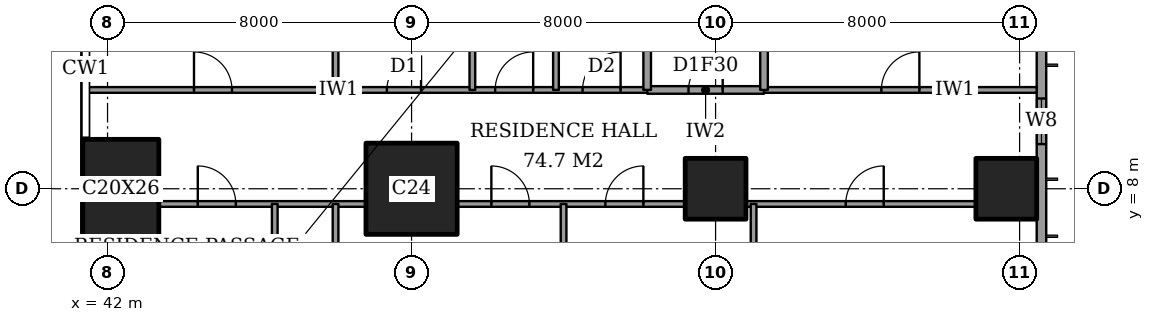
"""IFC4 building model, lengths in metres.
Left out: names, types, materials, properties, quantities, classifications, styles, units other than length and angle.
Written with IfcOpenShell. Run it as: python <this file> out.ifc"""

import sys

from ifc_helpers import new_model, si_unit, direction, frame, frame_2d, origin, origin_2d, place, context, subcontext, project, spatial, rectangle, extrude, element, fill, save


model = new_model("IFC4")
c1 = context("Model", 3, precision=1e-05, world=origin(), true_north=direction((0.0, 1.0)))
c2 = subcontext(c1, "Body", "Model", "MODEL_VIEW")
j1 = project(units=[si_unit("LENGTHUNIT", "METRE"), si_unit("PLANEANGLEUNIT", "RADIAN")], contexts=[c1])
p1 = place(None, origin())
s1 = spatial("IfcSite", under=j1, at=p1, CompositionType="ELEMENT")
p2 = place(p1, origin())
s2 = spatial("IfcBuilding", under=s1, at=p2, CompositionType="ELEMENT")
p3 = place(p2, frame((0.0, 0.0, 266.4)))
s3 = spatial("IfcBuildingStorey", under=s2, at=p3, CompositionType="ELEMENT", Elevation=266.4)
p4 = place(p3, frame((42.35, 8.0, 0.0), z_axis=(0.0, 0.0, 1.0), x_axis=(1.0, 0.0, 0.0)))
e1 = element("IfcColumn", 1, at=p4, inside=s3, PredefinedType="COLUMN", context=c2, shape_type="SweptSolid", body=[
    extrude(rectangle(XDim=2.0, YDim=2.6, at=origin_2d()), origin(), (0.0, 0.0, 1.0), 3.6),
])
p5 = place(p3, frame((50.0, 8.0, 0.0), z_axis=(0.0, 0.0, 1.0), x_axis=(1.0, 0.0, 0.0)))
e2 = element("IfcColumn", 2, at=p5, inside=s3, PredefinedType="COLUMN", context=c2, shape_type="SweptSolid", body=[
    extrude(rectangle(XDim=2.4, YDim=2.4, at=origin_2d()), origin(), (0.0, 0.0, 1.0), 3.6),
])
for number, where, z_axis, x_axis in (
    (3, (58.0, 8.0, 0.0), (0.0, 0.0, 1.0), (1.0, 0.0, 0.0)),
    (4, (65.65, 8.0, 0.0), (0.0, 0.0, 1.0), (1.0, 0.0, 0.0)),
):
    element("IfcColumn", number, at=place(p3, frame(where, z_axis=z_axis, x_axis=x_axis)), inside=s3, PredefinedType="COLUMN", context=c2, shape_type="SweptSolid", body=[
        extrude(rectangle(XDim=1.6, YDim=1.6, at=origin_2d()), origin(), (0.0, 0.0, 1.0), 3.6),
    ])
p6 = place(p3, frame((66.575, 3.175, 0.0), z_axis=(0.0, 0.0, 1.0), x_axis=(0.0, 1.0, 0.0)))
e5 = element("IfcWall", 5, at=p6, inside=s3, PredefinedType="SOLIDWALL", context=c2, shape_type="SweptSolid", body=[
    extrude(rectangle(XDim=41.65, YDim=0.25, at=frame_2d((20.825, 0.0))), origin(), (0.0, 0.0, 1.0), 3.6),
])
p7 = place(p6, frame((0.875, 0.0, 0.6)))
e6 = element("IfcOpeningElement", 6, at=p7, cuts=e5, PredefinedType="OPENING", context=c2, shape_type="SweptSolid", body=[
    extrude(rectangle(XDim=2.4, YDim=2.0, at=frame_2d((1.2, 1.0))), frame((0.0, 0.135, 0.0), z_axis=(0.0, -1.0, 0.0), x_axis=(1.0, 0.0, 0.0)), (0.0, 0.0, 1.0), 0.27),
])
p8 = place(p6, frame((6.0, 0.0, 0.6)))
e7 = element("IfcOpeningElement", 7, at=p8, cuts=e5, PredefinedType="OPENING", context=c2, shape_type="SweptSolid", body=[
    extrude(rectangle(XDim=1.2, YDim=2.0, at=frame_2d((0.6, 1.0))), frame((0.0, 0.135, 0.0), z_axis=(0.0, -1.0, 0.0), x_axis=(1.0, 0.0, 0.0)), (0.0, 0.0, 1.0), 0.27),
])
p9 = place(p6, frame((8.525, 0.0, 0.6)))
e8 = element("IfcOpeningElement", 8, at=p9, cuts=e5, PredefinedType="OPENING", context=c2, shape_type="SweptSolid", body=[
    extrude(rectangle(XDim=2.4, YDim=2.0, at=frame_2d((1.2, 1.0))), frame((0.0, 0.135, 0.0), z_axis=(0.0, -1.0, 0.0), x_axis=(1.0, 0.0, 0.0)), (0.0, 0.0, 1.0), 0.27),
])
p10 = place(p6, frame((15.625, 0.0, 0.6)))
e9 = element("IfcOpeningElement", 9, at=p10, cuts=e5, PredefinedType="OPENING", context=c2, shape_type="SweptSolid", body=[
    extrude(rectangle(XDim=2.4, YDim=2.0, at=frame_2d((1.2, 1.0))), frame((0.0, 0.135, 0.0), z_axis=(0.0, -1.0, 0.0), x_axis=(1.0, 0.0, 0.0)), (0.0, 0.0, 1.0), 0.27),
])
p11 = place(p6, frame((23.525, 0.0, 0.6)))
e10 = element("IfcOpeningElement", 10, at=p11, cuts=e5, PredefinedType="OPENING", context=c2, shape_type="SweptSolid", body=[
    extrude(rectangle(XDim=2.4, YDim=2.0, at=frame_2d((1.2, 1.0))), frame((0.0, 0.135, 0.0), z_axis=(0.0, -1.0, 0.0), x_axis=(1.0, 0.0, 0.0)), (0.0, 0.0, 1.0), 0.27),
])
p12 = place(p6, frame((30.625, 0.0, 0.6)))
e11 = element("IfcOpeningElement", 11, at=p12, cuts=e5, PredefinedType="OPENING", context=c2, shape_type="SweptSolid", body=[
    extrude(rectangle(XDim=2.4, YDim=2.0, at=frame_2d((1.2, 1.0))), frame((0.0, 0.135, 0.0), z_axis=(0.0, -1.0, 0.0), x_axis=(1.0, 0.0, 0.0)), (0.0, 0.0, 1.0), 0.27),
])
p13 = place(p6, frame((34.325, 0.0, 0.6)))
e12 = element("IfcOpeningElement", 12, at=p13, cuts=e5, PredefinedType="OPENING", context=c2, shape_type="SweptSolid", body=[
    extrude(rectangle(XDim=1.2, YDim=2.0, at=frame_2d((0.6, 1.0))), frame((0.0, 0.135, 0.0), z_axis=(0.0, -1.0, 0.0), x_axis=(1.0, 0.0, 0.0)), (0.0, 0.0, 1.0), 0.27),
])
p14 = place(p6, frame((38.375, 0.0, 0.6)))
e13 = element("IfcOpeningElement", 13, at=p14, cuts=e5, PredefinedType="OPENING", context=c2, shape_type="SweptSolid", body=[
    extrude(rectangle(XDim=2.4, YDim=2.0, at=frame_2d((1.2, 1.0))), frame((0.0, 0.135, 0.0), z_axis=(0.0, -1.0, 0.0), x_axis=(1.0, 0.0, 0.0)), (0.0, 0.0, 1.0), 0.27),
])
p15 = place(p3, frame((43.35, 7.6, 0.0), z_axis=(0.0, 0.0, 1.0), x_axis=(1.0, 0.0, 0.0)))
e14 = element("IfcWall", 14, at=p15, inside=s3, PredefinedType="PARTITIONING", context=c2, shape_type="SweptSolid", body=[
    extrude(rectangle(XDim=5.45, YDim=0.15, at=frame_2d((2.725, 0.0))), origin(), (0.0, 0.0, 1.0), 3.35),
])
p16 = place(p15, frame((1.025, 0.0, 0.0)))
e15 = element("IfcOpeningElement", 15, at=p16, cuts=e14, PredefinedType="OPENING", context=c2, shape_type="SweptSolid", body=[
    extrude(rectangle(XDim=1.0, YDim=2.1, at=frame_2d((0.5, 1.05))), frame((0.0, 0.085, 0.0), z_axis=(0.0, -1.0, 0.0), x_axis=(1.0, 0.0, 0.0)), (0.0, 0.0, 1.0), 0.17),
])
p17 = place(p3, frame((51.2, 7.6, 0.0), z_axis=(0.0, 0.0, 1.0), x_axis=(1.0, 0.0, 0.0)))
e16 = element("IfcWall", 16, at=p17, inside=s3, PredefinedType="PARTITIONING", context=c2, shape_type="SweptSolid", body=[
    extrude(rectangle(XDim=6.0, YDim=0.15, at=frame_2d((3.0, 0.0))), origin(), (0.0, 0.0, 1.0), 3.35),
])
p18 = place(p17, frame((3.9, 0.0, 0.0)))
e17 = element("IfcOpeningElement", 17, at=p18, cuts=e16, PredefinedType="OPENING", context=c2, shape_type="SweptSolid", body=[
    extrude(rectangle(XDim=1.0, YDim=2.1, at=frame_2d((0.5, 1.05))), frame((0.0, 0.085, 0.0), z_axis=(0.0, -1.0, 0.0), x_axis=(1.0, 0.0, 0.0)), (0.0, 0.0, 1.0), 0.17),
])
p19 = place(p17, frame((0.9, 0.0, 0.0)))
e18 = element("IfcOpeningElement", 18, at=p19, cuts=e16, PredefinedType="OPENING", context=c2, shape_type="SweptSolid", body=[
    extrude(rectangle(XDim=1.0, YDim=2.1, at=frame_2d((0.5, 1.05))), frame((0.0, 0.085, 0.0), z_axis=(0.0, -1.0, 0.0), x_axis=(1.0, 0.0, 0.0)), (0.0, 0.0, 1.0), 0.17),
])
p20 = place(p3, frame((58.8, 7.6, 0.0), z_axis=(0.0, 0.0, 1.0), x_axis=(1.0, 0.0, 0.0)))
e19 = element("IfcWall", 19, at=p20, inside=s3, PredefinedType="PARTITIONING", context=c2, shape_type="SweptSolid", body=[
    extrude(rectangle(XDim=6.05, YDim=0.15, at=frame_2d((3.025, 0.0))), origin(), (0.0, 0.0, 1.0), 3.35),
])
p21 = place(p20, frame((2.625, 0.0, 0.0)))
e20 = element("IfcOpeningElement", 20, at=p21, cuts=e19, PredefinedType="OPENING", context=c2, shape_type="SweptSolid", body=[
    extrude(rectangle(XDim=1.0, YDim=2.1, at=frame_2d((0.5, 1.05))), frame((0.0, 0.085, 0.0), z_axis=(0.0, -1.0, 0.0), x_axis=(1.0, 0.0, 0.0)), (0.0, 0.0, 1.0), 0.17),
])
p22 = place(p3, frame((56.2, 10.6, 0.0), z_axis=(0.0, 0.0, 1.0), x_axis=(1.0, 0.0, 0.0)))
e21 = element("IfcWall", 21, at=p22, inside=s3, PredefinedType="PARTITIONING", context=c2, shape_type="SweptSolid", body=[
    extrude(rectangle(XDim=3.075, YDim=0.2, at=frame_2d((1.538, 0.0))), origin(), (0.0, 0.0, 1.0), 3.35),
])
p23 = place(p22, frame((1.087, 0.0, 0.0)))
e22 = element("IfcOpeningElement", 22, at=p23, cuts=e21, PredefinedType="OPENING", context=c2, shape_type="SweptSolid", body=[
    extrude(rectangle(XDim=0.9, YDim=2.1, at=frame_2d((0.45, 1.05))), frame((0.0, 0.11, 0.0), z_axis=(0.0, -1.0, 0.0), x_axis=(1.0, 0.0, 0.0)), (0.0, 0.0, 1.0), 0.22),
])
p24 = place(p3, frame((41.439, 10.6, 0.0), z_axis=(0.0, 0.0, 1.0), x_axis=(1.0, 0.0, 0.0)))
e23 = element("IfcWall", 23, at=p24, inside=s3, PredefinedType="PARTITIONING", context=c2, shape_type="SweptSolid", body=[
    extrude(rectangle(XDim=14.761, YDim=0.15, at=frame_2d((7.38, 0.0))), origin(), (0.0, 0.0, 1.0), 3.35),
])
p25 = place(p24, frame((10.761, 0.0, 0.0)))
e24 = element("IfcOpeningElement", 24, at=p25, cuts=e23, PredefinedType="OPENING", context=c2, shape_type="SweptSolid", body=[
    extrude(rectangle(XDim=1.0, YDim=2.1, at=frame_2d((0.5, 1.05))), frame((0.0, 0.085, 0.0), z_axis=(0.0, -1.0, 0.0), x_axis=(1.0, 0.0, 0.0)), (0.0, 0.0, 1.0), 0.17),
])
p26 = place(p24, frame((13.061, 0.0, 0.0)))
e25 = element("IfcOpeningElement", 25, at=p26, cuts=e23, PredefinedType="OPENING", context=c2, shape_type="SweptSolid", body=[
    extrude(rectangle(XDim=1.0, YDim=2.1, at=frame_2d((0.5, 1.05))), frame((0.0, 0.085, 0.0), z_axis=(0.0, -1.0, 0.0), x_axis=(1.0, 0.0, 0.0)), (0.0, 0.0, 1.0), 0.17),
])
p27 = place(p24, frame((7.911, 0.0, 0.0)))
e26 = element("IfcOpeningElement", 26, at=p27, cuts=e23, PredefinedType="OPENING", context=c2, shape_type="SweptSolid", body=[
    extrude(rectangle(XDim=0.9, YDim=2.1, at=frame_2d((0.45, 1.05))), frame((0.0, 0.085, 0.0), z_axis=(0.0, -1.0, 0.0), x_axis=(1.0, 0.0, 0.0)), (0.0, 0.0, 1.0), 0.17),
])
p28 = place(p24, frame((2.836, 0.0, 0.0)))
e27 = element("IfcOpeningElement", 27, at=p28, cuts=e23, PredefinedType="OPENING", context=c2, shape_type="SweptSolid", body=[
    extrude(rectangle(XDim=1.0, YDim=2.1, at=frame_2d((0.5, 1.05))), frame((0.0, 0.085, 0.0), z_axis=(0.0, -1.0, 0.0), x_axis=(1.0, 0.0, 0.0)), (0.0, 0.0, 1.0), 0.17),
])
p29 = place(p3, frame((59.275, 10.6, 0.0), z_axis=(0.0, 0.0, 1.0), x_axis=(1.0, 0.0, 0.0)))
e28 = element("IfcWall", 28, at=p29, inside=s3, PredefinedType="PARTITIONING", context=c2, shape_type="SweptSolid", body=[
    extrude(rectangle(XDim=7.175, YDim=0.15, at=frame_2d((3.587, 0.0))), origin(), (0.0, 0.0, 1.0), 3.35),
])
p30 = place(p29, frame((3.087, 0.0, 0.0)))
e29 = element("IfcOpeningElement", 29, at=p30, cuts=e28, PredefinedType="OPENING", context=c2, shape_type="SweptSolid", body=[
    extrude(rectangle(XDim=1.0, YDim=2.1, at=frame_2d((0.5, 1.05))), frame((0.0, 0.085, 0.0), z_axis=(0.0, -1.0, 0.0), x_axis=(1.0, 0.0, 0.0)), (0.0, 0.0, 1.0), 0.17),
])
p31 = place(p3, frame((46.4, -0.45, 0.0), z_axis=(0.0, 0.0, 1.0), x_axis=(0.0, 1.0, 0.0)))
e30 = element("IfcWall", 30, at=p31, inside=s3, PredefinedType="PARTITIONING", context=c2, shape_type="SweptSolid", body=[
    extrude(rectangle(XDim=8.05, YDim=0.15, at=frame_2d((4.025, 0.0))), origin(), (0.0, 0.0, 1.0), 3.35),
])
p32 = place(p31, frame((3.575, 0.0, 0.0)))
e31 = element("IfcOpeningElement", 31, at=p32, cuts=e30, PredefinedType="OPENING", context=c2, shape_type="SweptSolid", body=[
    extrude(rectangle(XDim=0.9, YDim=2.1, at=frame_2d((0.45, 1.05))), frame((0.0, 0.085, 0.0), z_axis=(0.0, -1.0, 0.0), x_axis=(1.0, 0.0, 0.0)), (0.0, 0.0, 1.0), 0.17),
])
p33 = place(p3, frame((48.0, -0.45, 0.0), z_axis=(0.0, 0.0, 1.0), x_axis=(0.0, 1.0, 0.0)))
e32 = element("IfcWall", 32, at=p33, inside=s3, PredefinedType="PARTITIONING", context=c2, shape_type="SweptSolid", body=[
    extrude(rectangle(XDim=8.05, YDim=0.15, at=frame_2d((4.025, 0.0))), origin(), (0.0, 0.0, 1.0), 3.35),
])
for number, where, z_axis, x_axis in (
    (33, (48.0, 10.6, 0.0), (0.0, 0.0, 1.0), (0.0, 1.0, 0.0)),
    (34, (51.6, 10.6, 0.0), (0.0, 0.0, 1.0), (0.0, 1.0, 0.0)),
    (35, (53.8, 10.6, 0.0), (0.0, 0.0, 1.0), (0.0, 1.0, 0.0)),
):
    element("IfcWall", number, at=place(p3, frame(where, z_axis=z_axis, x_axis=x_axis)), inside=s3, PredefinedType="PARTITIONING", context=c2, shape_type="SweptSolid", body=[
        extrude(rectangle(XDim=5.9, YDim=0.15, at=frame_2d((2.95, 0.0))), origin(), (0.0, 0.0, 1.0), 3.35),
    ])
p34 = place(p3, frame((54.0, -0.45, 0.0), z_axis=(0.0, 0.0, 1.0), x_axis=(0.0, 1.0, 0.0)))
e36 = element("IfcWall", 36, at=p34, inside=s3, PredefinedType="PARTITIONING", context=c2, shape_type="SweptSolid", body=[
    extrude(rectangle(XDim=8.05, YDim=0.15, at=frame_2d((4.025, 0.0))), origin(), (0.0, 0.0, 1.0), 3.35),
])
p35 = place(p3, frame((56.2, 10.6, 0.0), z_axis=(0.0, 0.0, 1.0), x_axis=(0.0, 1.0, 0.0)))
e37 = element("IfcWall", 37, at=p35, inside=s3, PredefinedType="PARTITIONING", context=c2, shape_type="SweptSolid", body=[
    extrude(rectangle(XDim=3.2, YDim=0.2, at=frame_2d((1.6, 0.0))), origin(), (0.0, 0.0, 1.0), 3.35),
])
p36 = place(p3, frame((59.0, -0.45, 0.0), z_axis=(0.0, 0.0, 1.0), x_axis=(0.0, 1.0, 0.0)))
e38 = element("IfcWall", 38, at=p36, inside=s3, PredefinedType="PARTITIONING", context=c2, shape_type="SweptSolid", body=[
    extrude(rectangle(XDim=8.05, YDim=0.15, at=frame_2d((4.025, 0.0))), origin(), (0.0, 0.0, 1.0), 3.35),
])
p37 = place(p3, frame((59.275, 10.6, 0.0), z_axis=(0.0, 0.0, 1.0), x_axis=(0.0, 1.0, 0.0)))
e39 = element("IfcWall", 39, at=p37, inside=s3, PredefinedType="PARTITIONING", context=c2, shape_type="SweptSolid", body=[
    extrude(rectangle(XDim=3.2, YDim=0.2, at=frame_2d((1.6, 0.0))), origin(), (0.0, 0.0, 1.0), 3.35),
])
p38 = place(p8, origin())
e40 = element("IfcWindow", 40, at=p38, inside=s3, PartitioningType="SINGLE_PANEL", PredefinedType="WINDOW", context=c2, shape_type="SweptSolid", body=[
    extrude(rectangle(XDim=1.2, YDim=2.0, at=frame_2d((0.6, 1.0))), frame((0.0, 0.03, 0.0), z_axis=(0.0, -1.0, 0.0), x_axis=(1.0, 0.0, 0.0)), (0.0, 0.0, 1.0), 0.06),
])
fill(e7, e40)
p39 = place(p21, origin())
e41 = element("IfcDoor", 41, at=p39, inside=s3, OperationType="SINGLE_SWING_LEFT", PredefinedType="DOOR", context=c2, shape_type="SweptSolid", body=[
    extrude(rectangle(XDim=1.0, YDim=2.1, at=frame_2d((0.5, 1.05))), frame((0.0, 0.025, 0.0), z_axis=(0.0, -1.0, 0.0), x_axis=(1.0, 0.0, 0.0)), (0.0, 0.0, 1.0), 0.05),
])
fill(e20, e41)
p40 = place(p18, origin())
e42 = element("IfcDoor", 42, at=p40, inside=s3, OperationType="SINGLE_SWING_LEFT", PredefinedType="DOOR", context=c2, shape_type="SweptSolid", body=[
    extrude(rectangle(XDim=1.0, YDim=2.1, at=frame_2d((0.5, 1.05))), frame((0.0, 0.025, 0.0), z_axis=(0.0, -1.0, 0.0), x_axis=(1.0, 0.0, 0.0)), (0.0, 0.0, 1.0), 0.05),
])
fill(e17, e42)
p41 = place(p19, origin())
e43 = element("IfcDoor", 43, at=p41, inside=s3, OperationType="SINGLE_SWING_RIGHT", PredefinedType="DOOR", context=c2, shape_type="SweptSolid", body=[
    extrude(rectangle(XDim=1.0, YDim=2.1, at=frame_2d((0.5, 1.05))), frame((0.0, 0.025, 0.0), z_axis=(0.0, -1.0, 0.0), x_axis=(1.0, 0.0, 0.0)), (0.0, 0.0, 1.0), 0.05),
])
fill(e18, e43)
p42 = place(p16, origin())
e44 = element("IfcDoor", 44, at=p42, inside=s3, OperationType="SINGLE_SWING_RIGHT", PredefinedType="DOOR", context=c2, shape_type="SweptSolid", body=[
    extrude(rectangle(XDim=1.0, YDim=2.1, at=frame_2d((0.5, 1.05))), frame((0.0, 0.025, 0.0), z_axis=(0.0, -1.0, 0.0), x_axis=(1.0, 0.0, 0.0)), (0.0, 0.0, 1.0), 0.05),
])
fill(e15, e44)
p43 = place(p25, origin())
e45 = element("IfcDoor", 45, at=p43, inside=s3, OperationType="SINGLE_SWING_LEFT", PredefinedType="DOOR", context=c2, shape_type="SweptSolid", body=[
    extrude(rectangle(XDim=1.0, YDim=2.1, at=frame_2d((0.5, 1.05))), frame((0.0, 0.025, 0.0), z_axis=(0.0, -1.0, 0.0), x_axis=(1.0, 0.0, 0.0)), (0.0, 0.0, 1.0), 0.05),
])
fill(e24, e45)
p44 = place(p30, origin())
e46 = element("IfcDoor", 46, at=p44, inside=s3, OperationType="SINGLE_SWING_LEFT", PredefinedType="DOOR", context=c2, shape_type="SweptSolid", body=[
    extrude(rectangle(XDim=1.0, YDim=2.1, at=frame_2d((0.5, 1.05))), frame((0.0, 0.025, 0.0), z_axis=(0.0, -1.0, 0.0), x_axis=(1.0, 0.0, 0.0)), (0.0, 0.0, 1.0), 0.05),
])
fill(e29, e46)
p45 = place(p23, origin())
e47 = element("IfcDoor", 47, at=p45, inside=s3, OperationType="SINGLE_SWING_LEFT", PredefinedType="DOOR", context=c2, shape_type="SweptSolid", body=[
    extrude(rectangle(XDim=0.9, YDim=2.1, at=frame_2d((0.45, 1.05))), frame((0.0, 0.025, 0.0), z_axis=(0.0, -1.0, 0.0), x_axis=(1.0, 0.0, 0.0)), (0.0, 0.0, 1.0), 0.05),
])
fill(e22, e47)
p46 = place(p26, origin())
e48 = element("IfcDoor", 48, at=p46, inside=s3, OperationType="SINGLE_SWING_LEFT", PredefinedType="DOOR", context=c2, shape_type="SweptSolid", body=[
    extrude(rectangle(XDim=1.0, YDim=2.1, at=frame_2d((0.5, 1.05))), frame((0.0, 0.025, 0.0), z_axis=(0.0, -1.0, 0.0), x_axis=(1.0, 0.0, 0.0)), (0.0, 0.0, 1.0), 0.05),
])
fill(e25, e48)
p47 = place(p27, origin())
e49 = element("IfcDoor", 49, at=p47, inside=s3, OperationType="SINGLE_SWING_LEFT", PredefinedType="DOOR", context=c2, shape_type="SweptSolid", body=[
    extrude(rectangle(XDim=0.9, YDim=2.1, at=frame_2d((0.45, 1.05))), frame((0.0, 0.025, 0.0), z_axis=(0.0, -1.0, 0.0), x_axis=(1.0, 0.0, 0.0)), (0.0, 0.0, 1.0), 0.05),
])
fill(e26, e49)
p48 = place(p28, origin())
e50 = element("IfcDoor", 50, at=p48, inside=s3, OperationType="SINGLE_SWING_RIGHT", PredefinedType="DOOR", context=c2, shape_type="SweptSolid", body=[
    extrude(rectangle(XDim=1.0, YDim=2.1, at=frame_2d((0.5, 1.05))), frame((0.0, 0.025, 0.0), z_axis=(0.0, -1.0, 0.0), x_axis=(1.0, 0.0, 0.0)), (0.0, 0.0, 1.0), 0.05),
])
fill(e27, e50)
save(model, sys.argv[1])
